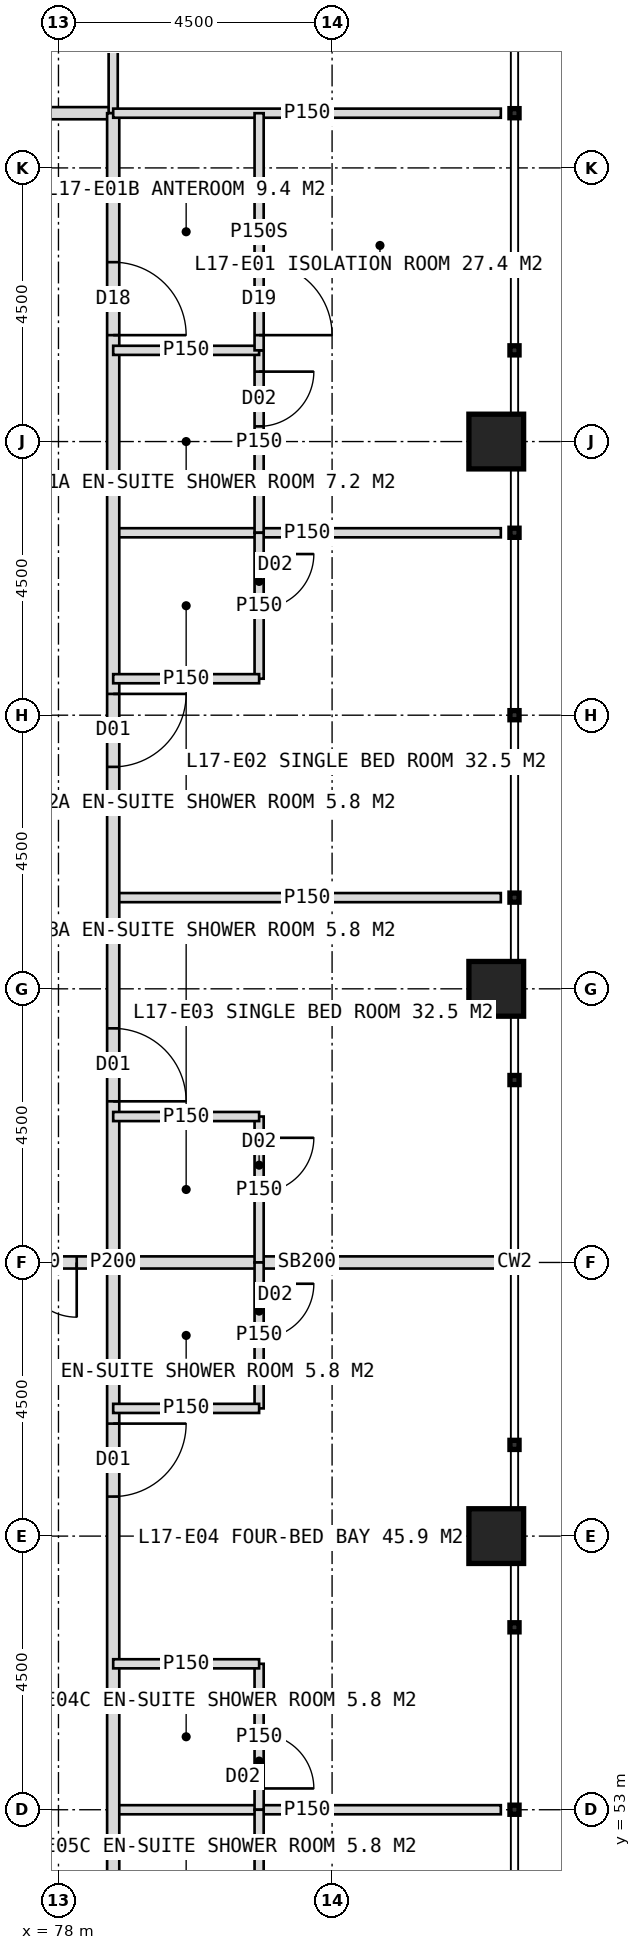
"""IFC4 building model, lengths in metres.
Left out: names, types, materials, properties, quantities, classifications, styles, units other than length and angle.
Written with IfcOpenShell. Run it as: python <this file> out.ifc"""

import sys

from ifc_helpers import new_model, si_unit, direction, frame, frame_2d, origin, origin_2d, place, context, subcontext, project, spatial, rectangle, hollow_rectangle, extrude, element, fill, save


model = new_model("IFC4")
c1 = context("Model", 3, precision=1e-05, world=origin(), true_north=direction((0.0, 1.0)))
c2 = subcontext(c1, "Body", "Model", "MODEL_VIEW")
j1 = project(units=[si_unit("LENGTHUNIT", "METRE"), si_unit("PLANEANGLEUNIT", "RADIAN")], contexts=[c1])
p1 = place(None, origin())
s1 = spatial("IfcSite", under=j1, at=p1, CompositionType="ELEMENT")
p2 = place(p1, origin())
s2 = spatial("IfcBuilding", under=s1, at=p2, CompositionType="ELEMENT")
p3 = place(p2, frame((0.0, 0.0, 75.0)))
s3 = spatial("IfcBuildingStorey", under=s2, at=p3, CompositionType="ELEMENT", Elevation=75.0)
for number, where, z_axis, x_axis in (
    (1, (85.2, 57.5, 0.0), (0.0, 0.0, 1.0), (1.0, 0.0, 0.0)),
    (2, (85.2, 66.5, 0.0), (0.0, 0.0, 1.0), (1.0, 0.0, 0.0)),
    (3, (85.2, 75.5, 0.0), (0.0, 0.0, 1.0), (1.0, 0.0, 0.0)),
):
    element("IfcColumn", number, at=place(p3, frame(where, z_axis=z_axis, x_axis=x_axis)), inside=s3, PredefinedType="COLUMN", context=c2, shape_type="SweptSolid", body=[
        extrude(hollow_rectangle(XDim=0.9, YDim=0.9, WallThickness=0.08, at=origin_2d()), origin(), (0.0, 0.0, 1.0), 4.0),
    ])
p4 = place(p3, frame((41.1, 80.9, 0.0), z_axis=(0.0, 0.0, 1.0), x_axis=(1.0, 0.0, 0.0)))
e4 = element("IfcWall", 4, at=p4, inside=s3, PredefinedType="PARTITIONING", context=c2, shape_type="SweptSolid", body=[
    extrude(rectangle(XDim=37.8, YDim=0.2, at=frame_2d((18.9, 0.0))), origin(), (0.0, 0.0, 1.0), 3.75),
])
p5 = place(p4, frame((5.85, 0.0, 0.0)))
e5 = element("IfcOpeningElement", 5, at=p5, cuts=e4, PredefinedType="OPENING", context=c2, shape_type="SweptSolid", body=[
    extrude(rectangle(XDim=1.2, YDim=2.2, at=frame_2d((0.6, 1.1))), frame((0.0, 0.11, 0.0), z_axis=(0.0, -1.0, 0.0), x_axis=(1.0, 0.0, 0.0)), (0.0, 0.0, 1.0), 0.22),
])
p6 = place(p4, frame((18.3, 0.0, 0.0)))
e6 = element("IfcOpeningElement", 6, at=p6, cuts=e4, PredefinedType="OPENING", context=c2, shape_type="SweptSolid", body=[
    extrude(rectangle(XDim=1.2, YDim=2.2, at=frame_2d((0.6, 1.1))), frame((0.0, 0.11, 0.0), z_axis=(0.0, -1.0, 0.0), x_axis=(1.0, 0.0, 0.0)), (0.0, 0.0, 1.0), 0.22),
])
p7 = place(p4, frame((33.95, 0.0, 0.0)))
e7 = element("IfcOpeningElement", 7, at=p7, cuts=e4, PredefinedType="OPENING", context=c2, shape_type="SweptSolid", body=[
    extrude(rectangle(XDim=1.2, YDim=2.2, at=frame_2d((0.6, 1.1))), frame((0.0, 0.11, 0.0), z_axis=(0.0, -1.0, 0.0), x_axis=(1.0, 0.0, 0.0)), (0.0, 0.0, 1.0), 0.22),
])
p8 = place(p3, frame((78.9, 80.9, 0.0), z_axis=(0.0, 0.0, 1.0), x_axis=(0.0, 1.0, 0.0)))
e8 = element("IfcWall", 8, at=p8, inside=s3, PredefinedType="PARTITIONING", context=c2, shape_type="SweptSolid", body=[
    extrude(rectangle(XDim=2.4, YDim=0.15, at=frame_2d((1.2, 0.0))), origin(), (0.0, 0.0, 1.0), 3.75),
])
for number, where, z_axis, x_axis in (
    (9, (78.9, 74.0, 0.0), (0.0, 0.0, 1.0), (1.0, 0.0, 0.0)),
    (10, (78.9, 68.0, 0.0), (0.0, 0.0, 1.0), (1.0, 0.0, 0.0)),
):
    element("IfcWall", number, at=place(p3, frame(where, z_axis=z_axis, x_axis=x_axis)), inside=s3, PredefinedType="PARTITIONING", context=c2, shape_type="SweptSolid", body=[
        extrude(rectangle(XDim=6.375, YDim=0.15, at=frame_2d((3.188, 0.0))), origin(), (0.0, 0.0, 1.0), 3.75),
    ])
p9 = place(p3, frame((78.9, 62.0, 0.0), z_axis=(0.0, 0.0, 1.0), x_axis=(1.0, 0.0, 0.0)))
e11 = element("IfcWall", 11, at=p9, inside=s3, PredefinedType="SOLIDWALL", context=c2, shape_type="SweptSolid", body=[
    extrude(rectangle(XDim=6.375, YDim=0.2, at=frame_2d((3.188, 0.0))), origin(), (0.0, 0.0, 1.0), 2.75),
])
p10 = place(p3, frame((78.9, 53.0, 0.0), z_axis=(0.0, 0.0, 1.0), x_axis=(1.0, 0.0, 0.0)))
e12 = element("IfcWall", 12, at=p10, inside=s3, PredefinedType="PARTITIONING", context=c2, shape_type="SweptSolid", body=[
    extrude(rectangle(XDim=6.375, YDim=0.15, at=frame_2d((3.188, 0.0))), origin(), (0.0, 0.0, 1.0), 3.75),
])
p11 = place(p3, frame((78.9, 80.9, 0.0), z_axis=(0.0, 0.0, 1.0), x_axis=(0.0, -1.0, 0.0)))
e13 = element("IfcWall", 13, at=p11, inside=s3, PredefinedType="PARTITIONING", context=c2, shape_type="SweptSolid", body=[
    extrude(rectangle(XDim=37.8, YDim=0.2, at=frame_2d((18.9, 0.0))), origin(), (0.0, 0.0, 1.0), 3.75),
])
p12 = place(p11, frame((2.45, 0.0, 0.0)))
e14 = element("IfcOpeningElement", 14, at=p12, cuts=e13, PredefinedType="OPENING", context=c2, shape_type="SweptSolid", body=[
    extrude(rectangle(XDim=1.2, YDim=2.2, at=frame_2d((0.6, 1.1))), frame((0.0, 0.11, 0.0), z_axis=(0.0, -1.0, 0.0), x_axis=(1.0, 0.0, 0.0)), (0.0, 0.0, 1.0), 0.22),
])
p13 = place(p11, frame((9.55, 0.0, 0.0)))
e15 = element("IfcOpeningElement", 15, at=p13, cuts=e13, PredefinedType="OPENING", context=c2, shape_type="SweptSolid", body=[
    extrude(rectangle(XDim=1.2, YDim=2.2, at=frame_2d((0.6, 1.1))), frame((0.0, 0.11, 0.0), z_axis=(0.0, -1.0, 0.0), x_axis=(1.0, 0.0, 0.0)), (0.0, 0.0, 1.0), 0.22),
])
p14 = place(p11, frame((15.05, 0.0, 0.0)))
e16 = element("IfcOpeningElement", 16, at=p14, cuts=e13, PredefinedType="OPENING", context=c2, shape_type="SweptSolid", body=[
    extrude(rectangle(XDim=1.2, YDim=2.2, at=frame_2d((0.6, 1.1))), frame((0.0, 0.11, 0.0), z_axis=(0.0, -1.0, 0.0), x_axis=(1.0, 0.0, 0.0)), (0.0, 0.0, 1.0), 0.22),
])
p15 = place(p11, frame((21.55, 0.0, 0.0)))
e17 = element("IfcOpeningElement", 17, at=p15, cuts=e13, PredefinedType="OPENING", context=c2, shape_type="SweptSolid", body=[
    extrude(rectangle(XDim=1.2, YDim=2.2, at=frame_2d((0.6, 1.1))), frame((0.0, 0.11, 0.0), z_axis=(0.0, -1.0, 0.0), x_axis=(1.0, 0.0, 0.0)), (0.0, 0.0, 1.0), 0.22),
])
p16 = place(p11, frame((33.95, 0.0, 0.0)))
e18 = element("IfcOpeningElement", 18, at=p16, cuts=e13, PredefinedType="OPENING", context=c2, shape_type="SweptSolid", body=[
    extrude(rectangle(XDim=1.2, YDim=2.2, at=frame_2d((0.6, 1.1))), frame((0.0, 0.11, 0.0), z_axis=(0.0, -1.0, 0.0), x_axis=(1.0, 0.0, 0.0)), (0.0, 0.0, 1.0), 0.22),
])
p17 = place(p3, frame((78.9, 80.9, 0.0), z_axis=(0.0, 0.0, 1.0), x_axis=(1.0, 0.0, 0.0)))
e19 = element("IfcWall", 19, at=p17, inside=s3, PredefinedType="PARTITIONING", context=c2, shape_type="SweptSolid", body=[
    extrude(rectangle(XDim=6.375, YDim=0.15, at=frame_2d((3.188, 0.0))), origin(), (0.0, 0.0, 1.0), 3.75),
])
p18 = place(p3, frame((81.3, 77.0, 0.0), z_axis=(0.0, 0.0, 1.0), x_axis=(0.0, -1.0, 0.0)))
e20 = element("IfcWall", 20, at=p18, inside=s3, PredefinedType="PARTITIONING", context=c2, shape_type="SweptSolid", body=[
    extrude(rectangle(XDim=3.0, YDim=0.15, at=frame_2d((1.5, 0.0))), origin(), (0.0, 0.0, 1.0), 3.75),
])
p19 = place(p18, frame((0.35, 0.0, 0.0)))
e21 = element("IfcOpeningElement", 21, at=p19, cuts=e20, PredefinedType="OPENING", context=c2, shape_type="SweptSolid", body=[
    extrude(rectangle(XDim=0.9, YDim=2.1, at=frame_2d((0.45, 1.05))), frame((0.0, 0.085, 0.0), z_axis=(0.0, -1.0, 0.0), x_axis=(1.0, 0.0, 0.0)), (0.0, 0.0, 1.0), 0.17),
])
p20 = place(p3, frame((78.9, 77.0, 0.0), z_axis=(0.0, 0.0, 1.0), x_axis=(1.0, 0.0, 0.0)))
e22 = element("IfcWall", 22, at=p20, inside=s3, PredefinedType="PARTITIONING", context=c2, shape_type="SweptSolid", body=[
    extrude(rectangle(XDim=2.4, YDim=0.15, at=frame_2d((1.2, 0.0))), origin(), (0.0, 0.0, 1.0), 3.75),
])
p21 = place(p3, frame((81.3, 80.9, 0.0), z_axis=(0.0, 0.0, 1.0), x_axis=(0.0, -1.0, 0.0)))
e23 = element("IfcWall", 23, at=p21, inside=s3, PredefinedType="PARTITIONING", context=c2, shape_type="SweptSolid", body=[
    extrude(rectangle(XDim=3.9, YDim=0.15, at=frame_2d((1.95, 0.0))), origin(), (0.0, 0.0, 1.0), 3.75),
])
p22 = place(p21, frame((2.45, 0.0, 0.0)))
e24 = element("IfcOpeningElement", 24, at=p22, cuts=e23, PredefinedType="OPENING", context=c2, shape_type="SweptSolid", body=[
    extrude(rectangle(XDim=1.2, YDim=2.2, at=frame_2d((0.6, 1.1))), frame((0.0, 0.085, 0.0), z_axis=(0.0, -1.0, 0.0), x_axis=(1.0, 0.0, 0.0)), (0.0, 0.0, 1.0), 0.17),
])
p23 = place(p3, frame((81.3, 74.0, 0.0), z_axis=(0.0, 0.0, 1.0), x_axis=(0.0, -1.0, 0.0)))
e25 = element("IfcWall", 25, at=p23, inside=s3, PredefinedType="PARTITIONING", context=c2, shape_type="SweptSolid", body=[
    extrude(rectangle(XDim=2.4, YDim=0.15, at=frame_2d((1.2, 0.0))), origin(), (0.0, 0.0, 1.0), 3.75),
])
p24 = place(p23, frame((0.35, 0.0, 0.0)))
e26 = element("IfcOpeningElement", 26, at=p24, cuts=e25, PredefinedType="OPENING", context=c2, shape_type="SweptSolid", body=[
    extrude(rectangle(XDim=0.9, YDim=2.1, at=frame_2d((0.45, 1.05))), frame((0.0, 0.085, 0.0), z_axis=(0.0, -1.0, 0.0), x_axis=(1.0, 0.0, 0.0)), (0.0, 0.0, 1.0), 0.17),
])
p25 = place(p3, frame((78.9, 71.6, 0.0), z_axis=(0.0, 0.0, 1.0), x_axis=(1.0, 0.0, 0.0)))
e27 = element("IfcWall", 27, at=p25, inside=s3, PredefinedType="PARTITIONING", context=c2, shape_type="SweptSolid", body=[
    extrude(rectangle(XDim=2.4, YDim=0.15, at=frame_2d((1.2, 0.0))), origin(), (0.0, 0.0, 1.0), 3.75),
])
p26 = place(p3, frame((81.3, 64.4, 0.0), z_axis=(0.0, 0.0, 1.0), x_axis=(0.0, -1.0, 0.0)))
e28 = element("IfcWall", 28, at=p26, inside=s3, PredefinedType="PARTITIONING", context=c2, shape_type="SweptSolid", body=[
    extrude(rectangle(XDim=2.4, YDim=0.15, at=frame_2d((1.2, 0.0))), origin(), (0.0, 0.0, 1.0), 3.75),
])
p27 = place(p26, frame((0.35, 0.0, 0.0)))
e29 = element("IfcOpeningElement", 29, at=p27, cuts=e28, PredefinedType="OPENING", context=c2, shape_type="SweptSolid", body=[
    extrude(rectangle(XDim=0.9, YDim=2.1, at=frame_2d((0.45, 1.05))), frame((0.0, 0.085, 0.0), z_axis=(0.0, -1.0, 0.0), x_axis=(1.0, 0.0, 0.0)), (0.0, 0.0, 1.0), 0.17),
])
p28 = place(p3, frame((78.9, 64.4, 0.0), z_axis=(0.0, 0.0, 1.0), x_axis=(1.0, 0.0, 0.0)))
e30 = element("IfcWall", 30, at=p28, inside=s3, PredefinedType="PARTITIONING", context=c2, shape_type="SweptSolid", body=[
    extrude(rectangle(XDim=2.4, YDim=0.15, at=frame_2d((1.2, 0.0))), origin(), (0.0, 0.0, 1.0), 3.75),
])
p29 = place(p3, frame((81.3, 62.0, 0.0), z_axis=(0.0, 0.0, 1.0), x_axis=(0.0, -1.0, 0.0)))
e31 = element("IfcWall", 31, at=p29, inside=s3, PredefinedType="PARTITIONING", context=c2, shape_type="SweptSolid", body=[
    extrude(rectangle(XDim=2.4, YDim=0.15, at=frame_2d((1.2, 0.0))), origin(), (0.0, 0.0, 1.0), 3.75),
])
p30 = place(p29, frame((0.35, 0.0, 0.0)))
e32 = element("IfcOpeningElement", 32, at=p30, cuts=e31, PredefinedType="OPENING", context=c2, shape_type="SweptSolid", body=[
    extrude(rectangle(XDim=0.9, YDim=2.1, at=frame_2d((0.45, 1.05))), frame((0.0, 0.085, 0.0), z_axis=(0.0, -1.0, 0.0), x_axis=(1.0, 0.0, 0.0)), (0.0, 0.0, 1.0), 0.17),
])
p31 = place(p3, frame((78.9, 59.6, 0.0), z_axis=(0.0, 0.0, 1.0), x_axis=(1.0, 0.0, 0.0)))
e33 = element("IfcWall", 33, at=p31, inside=s3, PredefinedType="PARTITIONING", context=c2, shape_type="SweptSolid", body=[
    extrude(rectangle(XDim=2.4, YDim=0.15, at=frame_2d((1.2, 0.0))), origin(), (0.0, 0.0, 1.0), 3.75),
])
p32 = place(p3, frame((81.3, 55.4, 0.0), z_axis=(0.0, 0.0, 1.0), x_axis=(0.0, -1.0, 0.0)))
e34 = element("IfcWall", 34, at=p32, inside=s3, PredefinedType="PARTITIONING", context=c2, shape_type="SweptSolid", body=[
    extrude(rectangle(XDim=2.4, YDim=0.15, at=frame_2d((1.2, 0.0))), origin(), (0.0, 0.0, 1.0), 3.75),
])
p33 = place(p32, frame((1.15, 0.0, 0.0)))
e35 = element("IfcOpeningElement", 35, at=p33, cuts=e34, PredefinedType="OPENING", context=c2, shape_type="SweptSolid", body=[
    extrude(rectangle(XDim=0.9, YDim=2.1, at=frame_2d((0.45, 1.05))), frame((0.0, 0.085, 0.0), z_axis=(0.0, -1.0, 0.0), x_axis=(1.0, 0.0, 0.0)), (0.0, 0.0, 1.0), 0.17),
])
p34 = place(p3, frame((78.9, 55.4, 0.0), z_axis=(0.0, 0.0, 1.0), x_axis=(1.0, 0.0, 0.0)))
e36 = element("IfcWall", 36, at=p34, inside=s3, PredefinedType="PARTITIONING", context=c2, shape_type="SweptSolid", body=[
    extrude(rectangle(XDim=2.4, YDim=0.15, at=frame_2d((1.2, 0.0))), origin(), (0.0, 0.0, 1.0), 3.75),
])
p35 = place(p3, frame((81.3, 53.0, 0.0), z_axis=(0.0, 0.0, 1.0), x_axis=(0.0, -1.0, 0.0)))
e37 = element("IfcWall", 37, at=p35, inside=s3, PredefinedType="PARTITIONING", context=c2, shape_type="SweptSolid", body=[
    extrude(rectangle(XDim=2.4, YDim=0.15, at=frame_2d((1.2, 0.0))), origin(), (0.0, 0.0, 1.0), 3.75),
])
p36 = place(p35, frame((1.15, 0.0, 0.0)))
e38 = element("IfcOpeningElement", 38, at=p36, cuts=e37, PredefinedType="OPENING", context=c2, shape_type="SweptSolid", body=[
    extrude(rectangle(XDim=0.9, YDim=2.1, at=frame_2d((0.45, 1.05))), frame((0.0, 0.085, 0.0), z_axis=(0.0, -1.0, 0.0), x_axis=(1.0, 0.0, 0.0)), (0.0, 0.0, 1.0), 0.17),
])
p37 = place(p3, frame((76.2, 62.0, 0.0), z_axis=(0.0, 0.0, 1.0), x_axis=(1.0, 0.0, 0.0)))
e39 = element("IfcWall", 39, at=p37, inside=s3, PredefinedType="SOLIDWALL", context=c2, shape_type="SweptSolid", body=[
    extrude(rectangle(XDim=2.7, YDim=0.2, at=frame_2d((1.35, 0.0))), origin(), (0.0, 0.0, 1.0), 2.75),
])
p38 = place(p37, frame((0.3, 0.0, 0.0)))
e40 = element("IfcOpeningElement", 40, at=p38, cuts=e39, PredefinedType="OPENING", context=c2, shape_type="SweptSolid", body=[
    extrude(rectangle(XDim=1.8, YDim=2.2, at=frame_2d((0.9, 1.1))), frame((0.0, 0.11, 0.0), z_axis=(0.0, -1.0, 0.0), x_axis=(1.0, 0.0, 0.0)), (0.0, 0.0, 1.0), 0.22),
])
p39 = place(p22, origin())
e41 = element("IfcDoor", 41, at=p39, inside=s3, OperationType="SINGLE_SWING_RIGHT", PredefinedType="DOOR", context=c2, shape_type="SweptSolid", body=[
    extrude(rectangle(XDim=1.2, YDim=2.2, at=frame_2d((0.6, 1.1))), frame((0.0, 0.025, 0.0), z_axis=(0.0, -1.0, 0.0), x_axis=(1.0, 0.0, 0.0)), (0.0, 0.0, 1.0), 0.05),
])
fill(e24, e41)
p40 = place(p12, origin())
e42 = element("IfcDoor", 42, at=p40, inside=s3, OperationType="SINGLE_SWING_RIGHT", PredefinedType="DOOR", context=c2, shape_type="SweptSolid", body=[
    extrude(rectangle(XDim=1.2, YDim=2.2, at=frame_2d((0.6, 1.1))), frame((0.0, 0.025, 0.0), z_axis=(0.0, -1.0, 0.0), x_axis=(1.0, 0.0, 0.0)), (0.0, 0.0, 1.0), 0.05),
])
fill(e14, e42)
p41 = place(p19, origin())
e43 = element("IfcDoor", 43, at=p41, inside=s3, OperationType="SINGLE_SWING_LEFT", PredefinedType="DOOR", context=c2, shape_type="SweptSolid", body=[
    extrude(rectangle(XDim=0.9, YDim=2.1, at=frame_2d((0.45, 1.05))), frame((0.0, 0.025, 0.0), z_axis=(0.0, -1.0, 0.0), x_axis=(1.0, 0.0, 0.0)), (0.0, 0.0, 1.0), 0.05),
])
fill(e21, e43)
p42 = place(p13, origin())
e44 = element("IfcDoor", 44, at=p42, inside=s3, OperationType="SINGLE_SWING_LEFT", PredefinedType="DOOR", context=c2, shape_type="SweptSolid", body=[
    extrude(rectangle(XDim=1.2, YDim=2.2, at=frame_2d((0.6, 1.1))), frame((0.0, 0.025, 0.0), z_axis=(0.0, -1.0, 0.0), x_axis=(1.0, 0.0, 0.0)), (0.0, 0.0, 1.0), 0.05),
])
fill(e15, e44)
p43 = place(p24, origin())
e45 = element("IfcDoor", 45, at=p43, inside=s3, OperationType="SINGLE_SWING_LEFT", PredefinedType="DOOR", context=c2, shape_type="SweptSolid", body=[
    extrude(rectangle(XDim=0.9, YDim=2.1, at=frame_2d((0.45, 1.05))), frame((0.0, 0.025, 0.0), z_axis=(0.0, -1.0, 0.0), x_axis=(1.0, 0.0, 0.0)), (0.0, 0.0, 1.0), 0.05),
])
fill(e26, e45)
p44 = place(p14, origin())
e46 = element("IfcDoor", 46, at=p44, inside=s3, OperationType="SINGLE_SWING_RIGHT", PredefinedType="DOOR", context=c2, shape_type="SweptSolid", body=[
    extrude(rectangle(XDim=1.2, YDim=2.2, at=frame_2d((0.6, 1.1))), frame((0.0, 0.025, 0.0), z_axis=(0.0, -1.0, 0.0), x_axis=(1.0, 0.0, 0.0)), (0.0, 0.0, 1.0), 0.05),
])
fill(e16, e46)
p45 = place(p27, origin())
e47 = element("IfcDoor", 47, at=p45, inside=s3, OperationType="SINGLE_SWING_LEFT", PredefinedType="DOOR", context=c2, shape_type="SweptSolid", body=[
    extrude(rectangle(XDim=0.9, YDim=2.1, at=frame_2d((0.45, 1.05))), frame((0.0, 0.025, 0.0), z_axis=(0.0, -1.0, 0.0), x_axis=(1.0, 0.0, 0.0)), (0.0, 0.0, 1.0), 0.05),
])
fill(e29, e47)
p46 = place(p15, origin())
e48 = element("IfcDoor", 48, at=p46, inside=s3, OperationType="SINGLE_SWING_LEFT", PredefinedType="DOOR", context=c2, shape_type="SweptSolid", body=[
    extrude(rectangle(XDim=1.2, YDim=2.2, at=frame_2d((0.6, 1.1))), frame((0.0, 0.025, 0.0), z_axis=(0.0, -1.0, 0.0), x_axis=(1.0, 0.0, 0.0)), (0.0, 0.0, 1.0), 0.05),
])
fill(e17, e48)
p47 = place(p30, origin())
e49 = element("IfcDoor", 49, at=p47, inside=s3, OperationType="SINGLE_SWING_LEFT", PredefinedType="DOOR", context=c2, shape_type="SweptSolid", body=[
    extrude(rectangle(XDim=0.9, YDim=2.1, at=frame_2d((0.45, 1.05))), frame((0.0, 0.025, 0.0), z_axis=(0.0, -1.0, 0.0), x_axis=(1.0, 0.0, 0.0)), (0.0, 0.0, 1.0), 0.05),
])
fill(e32, e49)
p48 = place(p33, origin())
e50 = element("IfcDoor", 50, at=p48, inside=s3, OperationType="SINGLE_SWING_RIGHT", PredefinedType="DOOR", context=c2, shape_type="SweptSolid", body=[
    extrude(rectangle(XDim=0.9, YDim=2.1, at=frame_2d((0.45, 1.05))), frame((0.0, 0.025, 0.0), z_axis=(0.0, -1.0, 0.0), x_axis=(1.0, 0.0, 0.0)), (0.0, 0.0, 1.0), 0.05),
])
fill(e35, e50)
p49 = place(p38, origin())
e51 = element("IfcDoor", 51, at=p49, inside=s3, OperationType="DOUBLE_DOOR_DOUBLE_SWING", PredefinedType="DOOR", context=c2, shape_type="SweptSolid", body=[
    extrude(rectangle(XDim=1.8, YDim=2.2, at=frame_2d((0.9, 1.1))), frame((0.0, 0.025, 0.0), z_axis=(0.0, -1.0, 0.0), x_axis=(1.0, 0.0, 0.0)), (0.0, 0.0, 1.0), 0.05),
])
fill(e40, e51)
save(model, sys.argv[1])
